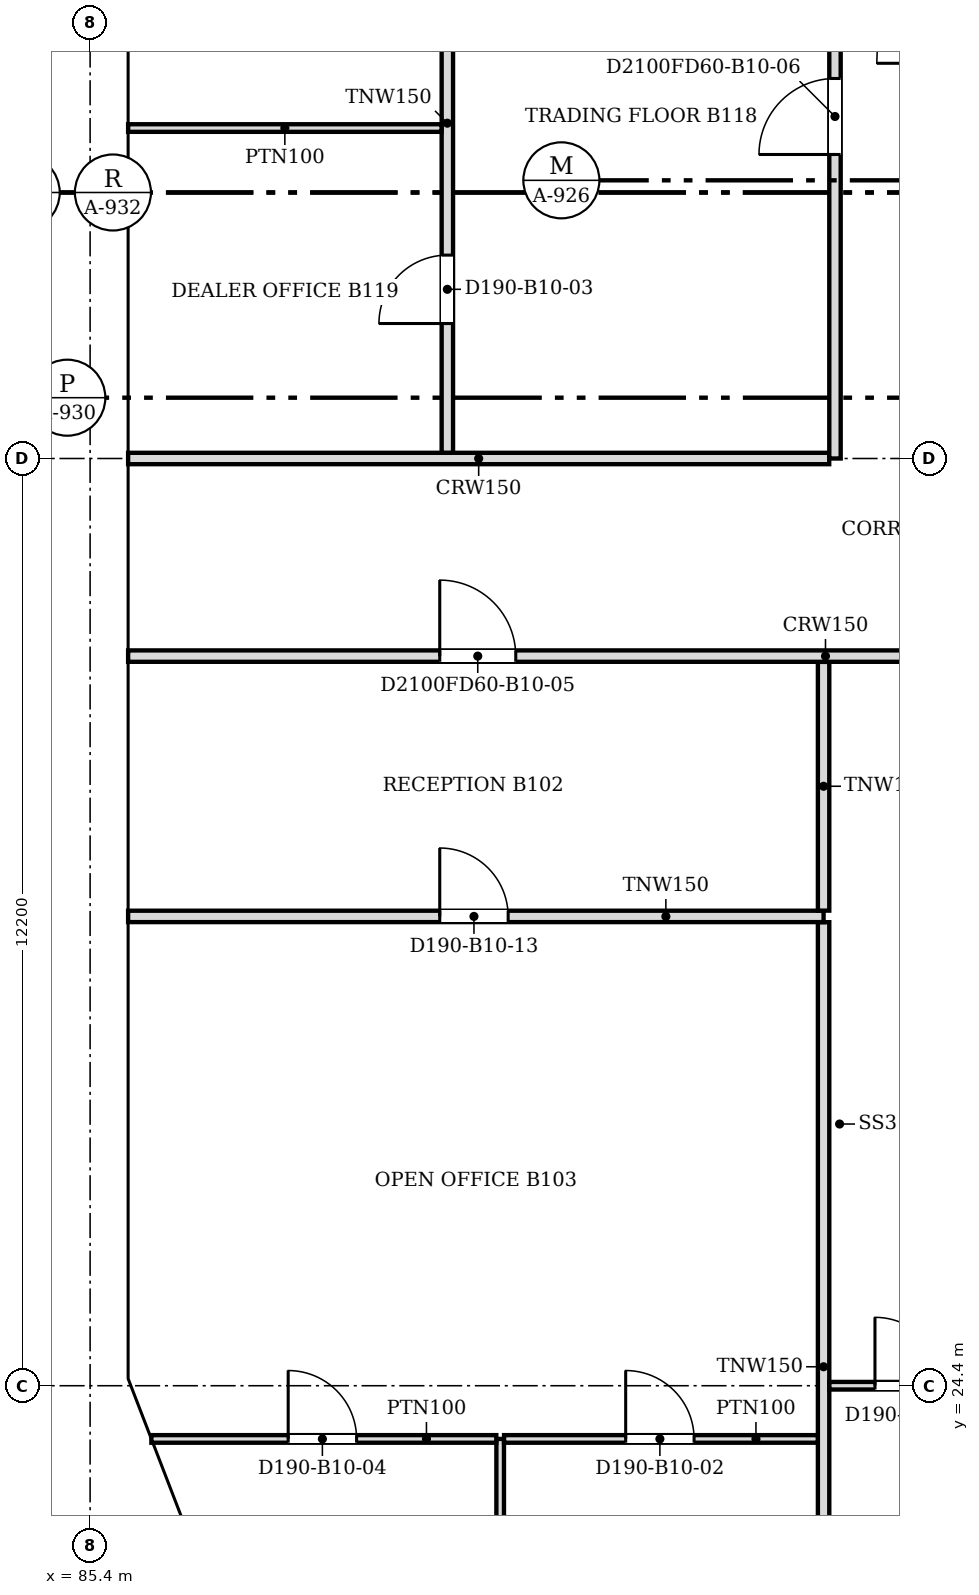
"""IFC4 building model, lengths in metres.
Left out: names, types, materials, properties, quantities, classifications, styles, units other than length and angle.
Written with IfcOpenShell. Run it as: python <this file> out.ifc"""

import sys

from ifc_helpers import new_model, si_unit, direction, frame, frame_2d, origin, place, context, subcontext, project, spatial, polyline, rectangle, outline, extrude, faceted_brep, source, transform, mapped, element, fill, save


model = new_model("IFC4")
c1 = context("Model", 3, precision=1e-05, world=origin(), true_north=direction((0.0, 1.0)))
c2 = subcontext(c1, "Body", "Model", "MODEL_VIEW")
j1 = project(units=[si_unit("LENGTHUNIT", "METRE"), si_unit("PLANEANGLEUNIT", "RADIAN")], contexts=[c1])
p1 = place(None, origin())
s1 = spatial("IfcSite", under=j1, at=p1, CompositionType="ELEMENT")
p2 = place(p1, origin())
s2 = spatial("IfcBuilding", under=s1, at=p2, CompositionType="ELEMENT")
p3 = place(p2, frame((0.0, 0.0, 102.8)))
s3 = spatial("IfcBuildingStorey", under=s2, at=p3, CompositionType="ELEMENT", Elevation=102.8)
m1 = source(origin(), c2, "Body", "Brep", [
    faceted_brep([(3.05, -0.25, 0.0), (6.1, -0.25, 3.8), (6.1, -0.25, 3.8), (3.05, -0.25, 7.6), (0.0, -0.25, 3.8), (0.0, 0.25, 3.8), (3.05, 0.25, 7.6), (6.1, 0.25, 3.8), (6.1, 0.25, 3.8), (3.05, 0.25, 0.0)], [[[0, 1, 2, 3, 4]], [[5, 6, 7, 8, 9]], [[9, 8, 1, 0]], [[7, 6, 3, 2]], [[6, 5, 4, 3]], [[5, 9, 0, 4]], [[1, 8, 7, 2]]]),
])
p4 = place(p3, frame((85.65, 42.7, -3.8), z_axis=(0.0, 0.0, 1.0), x_axis=(0.0, -1.0, 0.0)))
e1 = element("IfcWall", 1, at=p4, inside=s3, PredefinedType="SOLIDWALL", context=c2, shape_type="MappedRepresentation", body=[
    mapped(m1, transform((0.0, 0.0, 0.0), scale=1.0)),
])
m2 = source(origin(), c2, "Body", "SweptSolid", [
    extrude(outline(polyline([(3.05, 0.399), (5.78, 3.8), (3.05, 7.201), (0.321, 3.8), (3.05, 0.399)])), frame((0.0, 0.26, 0.0), z_axis=(0.0, -1.0, 0.0), x_axis=(1.0, 0.0, 0.0)), (0.0, 0.0, 1.0), 0.52),
])
p5 = place(p4, origin())
e2 = element("IfcOpeningElement", 2, at=p5, cuts=e1, PredefinedType="OPENING", context=c2, shape_type="MappedRepresentation", body=[
    mapped(m2, transform((0.0, 0.0, 0.0), scale=1.0)),
])
m3 = source(origin(), c2, "Body", "SweptSolid", [
    extrude(outline(polyline([(3.05, 0.0), (6.1, 3.8), (3.05, 7.6), (0.0, 3.8), (3.05, 0.0)])), frame((0.0, 0.25, 0.0), z_axis=(0.0, -1.0, 0.0), x_axis=(1.0, 0.0, 0.0)), (0.0, 0.0, 1.0), 0.5),
])
p6 = place(p3, frame((85.65, 36.6, -3.8), z_axis=(0.0, 0.0, 1.0), x_axis=(0.0, -1.0, 0.0)))
e3 = element("IfcWall", 3, at=p6, inside=s3, PredefinedType="SOLIDWALL", context=c2, shape_type="MappedRepresentation", body=[
    mapped(m3, transform((0.0, 0.0, 0.0), scale=1.0)),
])
p7 = place(p6, origin())
e4 = element("IfcOpeningElement", 4, at=p7, cuts=e3, PredefinedType="OPENING", context=c2, shape_type="MappedRepresentation", body=[
    mapped(m2, transform((0.0, 0.0, 0.0), scale=1.0)),
])
m4 = source(origin(), c2, "Body", "Brep", [
    faceted_brep([(3.05, -0.25, 0.0), (6.053, -0.25, 3.8), (3.05, -0.25, 7.6), (0.0, -0.25, 3.8), (0.0, 0.25, 3.8), (3.05, 0.25, 7.6), (6.007, 0.25, 3.859), (6.007, 0.25, 3.741), (3.05, 0.25, 0.0), (6.053, 0.0, 3.8)], [[[0, 1, 2, 3]], [[4, 5, 6, 7, 8]], [[8, 7, 9, 1, 0]], [[6, 5, 2, 1, 9]], [[5, 4, 3, 2]], [[4, 8, 0, 3]], [[9, 7, 6]]]),
])
p8 = place(p3, frame((85.65, 30.5, -3.8), z_axis=(0.0, 0.0, 1.0), x_axis=(0.0, -1.0, 0.0)))
e5 = element("IfcWall", 5, at=p8, inside=s3, PredefinedType="SOLIDWALL", context=c2, shape_type="MappedRepresentation", body=[
    mapped(m4, transform((0.0, 0.0, 0.0), scale=1.0)),
])
m5 = source(origin(), c2, "Body", "SweptSolid", [
    extrude(outline(polyline([(3.049, 0.401), (5.735, 3.8), (3.049, 7.199), (0.321, 3.8), (3.049, 0.401)])), frame((0.0, 0.26, 0.0), z_axis=(0.0, -1.0, 0.0), x_axis=(1.0, 0.0, 0.0)), (0.0, 0.0, 1.0), 0.52),
])
p9 = place(p8, origin())
e6 = element("IfcOpeningElement", 6, at=p9, cuts=e5, PredefinedType="OPENING", context=c2, shape_type="MappedRepresentation", body=[
    mapped(m5, transform((0.0, 0.0, 0.0), scale=1.0)),
])
m6 = source(origin(), c2, "Body", "Brep", [
    faceted_brep([(2.95, -0.25, 0.0), (3.003, -0.25, 0.068), (3.003, -0.25, 7.532), (2.95, -0.25, 7.6), (0.0, -0.25, 3.8), (0.047, 0.25, 3.86), (2.898, 0.25, 7.532), (2.898, 0.25, 0.068), (0.047, 0.25, 3.74), (2.95, 0.0, 0.0), (2.95, 0.0, 7.6), (0.0, 0.0, 3.8)], [[[0, 1, 2, 3, 4]], [[5, 6, 7, 8]], [[1, 0, 9]], [[10, 3, 2]], [[6, 5, 11, 4, 3, 10]], [[8, 7, 9, 0, 4, 11]], [[8, 11, 5]], [[1, 9, 7, 6, 10, 2]]]),
])
p10 = place(p3, frame((85.65, 24.447, -3.8), z_axis=(0.0, 0.0, 1.0), x_axis=(0.35992665181, -0.932980602862, 0.0)))
e7 = element("IfcWall", 7, at=p10, inside=s3, PredefinedType="SOLIDWALL", context=c2, shape_type="MappedRepresentation", body=[
    mapped(m6, transform((0.0, 0.0, 0.0), scale=1.0)),
])
m7 = source(origin(), c2, "Body", "SweptSolid", [
    extrude(outline(polyline([(2.75, 6.935), (0.316, 3.8), (2.75, 0.665), (2.75, 6.935)])), frame((0.0, 0.26, 0.0), z_axis=(0.0, -1.0, 0.0), x_axis=(1.0, 0.0, 0.0)), (0.0, 0.0, 1.0), 0.52),
])
p11 = place(p10, origin())
e8 = element("IfcOpeningElement", 8, at=p11, cuts=e7, PredefinedType="OPENING", context=c2, shape_type="MappedRepresentation", body=[
    mapped(m7, transform((0.0, 0.0, 0.0), scale=1.0)),
])
m8 = source(origin(), c2, "Body", "SweptSolid", [
    extrude(outline(polyline([(3.05, 0.0), (6.1, 3.8), (0.0, 3.8), (3.05, 0.0)])), frame((0.0, 0.25, 0.0), z_axis=(0.0, -1.0, 0.0), x_axis=(1.0, 0.0, 0.0)), (0.0, 0.0, 1.0), 0.5),
])
p12 = place(p3, frame((85.65, 45.75, 0.0), z_axis=(0.0, 0.0, 1.0), x_axis=(0.0, -1.0, 0.0)))
e9 = element("IfcWall", 9, at=p12, inside=s3, PredefinedType="SOLIDWALL", context=c2, shape_type="MappedRepresentation", body=[
    mapped(m8, transform((0.0, 0.0, 0.0), scale=1.0)),
])
m9 = source(origin(), c2, "Body", "SweptSolid", [
    extrude(outline(polyline([(3.05, 0.399), (5.579, 3.55), (0.521, 3.55), (3.05, 0.399)])), frame((0.0, 0.26, 0.0), z_axis=(0.0, -1.0, 0.0), x_axis=(1.0, 0.0, 0.0)), (0.0, 0.0, 1.0), 0.52),
])
p13 = place(p12, origin())
e10 = element("IfcOpeningElement", 10, at=p13, cuts=e9, PredefinedType="OPENING", context=c2, shape_type="MappedRepresentation", body=[
    mapped(m9, transform((0.0, 0.0, 0.0), scale=1.0)),
])
m10 = source(origin(), c2, "Body", "Brep", [
    faceted_brep([(3.05, -0.25, 0.0), (6.1, -0.25, 3.8), (6.1, -0.25, 3.8), (0.0, -0.25, 3.8), (0.0, 0.25, 3.8), (6.1, 0.25, 3.8), (6.1, 0.25, 3.8), (3.05, 0.25, 0.0)], [[[0, 1, 2, 3]], [[4, 5, 6, 7]], [[7, 6, 1, 0]], [[5, 4, 3, 2]], [[4, 7, 0, 3]], [[1, 6, 5, 2]]]),
])
p14 = place(p3, frame((85.65, 39.65, 0.0), z_axis=(0.0, 0.0, 1.0), x_axis=(0.0, -1.0, 0.0)))
e11 = element("IfcWall", 11, at=p14, inside=s3, PredefinedType="SOLIDWALL", context=c2, shape_type="MappedRepresentation", body=[
    mapped(m10, transform((0.0, 0.0, 0.0), scale=1.0)),
])
p15 = place(p14, origin())
e12 = element("IfcOpeningElement", 12, at=p15, cuts=e11, PredefinedType="OPENING", context=c2, shape_type="MappedRepresentation", body=[
    mapped(m9, transform((0.0, 0.0, 0.0), scale=1.0)),
])
p16 = place(p3, frame((85.65, 33.55, 0.0), z_axis=(0.0, 0.0, 1.0), x_axis=(0.0, -1.0, 0.0)))
e13 = element("IfcWall", 13, at=p16, inside=s3, PredefinedType="SOLIDWALL", context=c2, shape_type="MappedRepresentation", body=[
    mapped(m8, transform((0.0, 0.0, 0.0), scale=1.0)),
])
p17 = place(p16, origin())
e14 = element("IfcOpeningElement", 14, at=p17, cuts=e13, PredefinedType="OPENING", context=c2, shape_type="MappedRepresentation", body=[
    mapped(m9, transform((0.0, 0.0, 0.0), scale=1.0)),
])
m11 = source(origin(), c2, "Body", "Brep", [
    faceted_brep([(3.003, -0.25, 0.0), (3.05, -0.25, 0.06), (3.05, -0.25, 3.8), (0.0, -0.25, 3.8), (0.0, 0.25, 3.8), (2.957, 0.25, 3.8), (2.957, 0.25, 0.059), (3.003, 0.0, 0.0)], [[[0, 1, 2, 3]], [[4, 5, 6]], [[1, 0, 7]], [[5, 4, 3, 2]], [[4, 6, 7, 0, 3]], [[1, 7, 6, 5, 2]]]),
])
p18 = place(p3, frame((85.65, 27.45, 0.0), z_axis=(0.0, 0.0, 1.0), x_axis=(0.0, -1.0, 0.0)))
e15 = element("IfcWall", 15, at=p18, inside=s3, PredefinedType="SOLIDWALL", context=c2, shape_type="MappedRepresentation", body=[
    mapped(m11, transform((0.0, 0.0, 0.0), scale=1.0)),
])
m12 = source(origin(), c2, "Body", "SweptSolid", [
    extrude(outline(polyline([(2.803, 3.55), (0.516, 3.55), (2.803, 0.656), (2.803, 3.55)])), frame((0.0, 0.26, 0.0), z_axis=(0.0, -1.0, 0.0), x_axis=(1.0, 0.0, 0.0)), (0.0, 0.0, 1.0), 0.52),
])
p19 = place(p18, origin())
e16 = element("IfcOpeningElement", 16, at=p19, cuts=e15, PredefinedType="OPENING", context=c2, shape_type="MappedRepresentation", body=[
    mapped(m12, transform((0.0, 0.0, 0.0), scale=1.0)),
])
m13 = source(origin(), c2, "Body", "Brep", [
    faceted_brep([(0.047, -0.25, 0.0), (2.997, -0.25, 3.8), (0.0, -0.25, 3.8), (0.0, -0.25, 0.059), (0.093, 0.25, 3.8), (2.944, 0.25, 3.8), (2.944, 0.25, 3.732), (0.093, 0.25, 0.06), (2.997, 0.0, 3.8), (0.047, 0.0, 0.0)], [[[0, 1, 2, 3]], [[4, 5, 6, 7]], [[7, 6, 8, 1, 0, 9]], [[5, 4, 2, 1, 8]], [[9, 0, 3]], [[7, 9, 3, 2, 4]], [[6, 5, 8]]]),
])
p20 = place(p3, frame((85.633, 24.49, 0.0), z_axis=(0.0, 0.0, 1.0), x_axis=(0.359901446078, -0.932990326376, 0.0)))
e17 = element("IfcWall", 17, at=p20, inside=s3, PredefinedType="SOLIDWALL", context=c2, shape_type="MappedRepresentation", body=[
    mapped(m13, transform((0.0, 0.0, 0.0), scale=1.0)),
])
m14 = source(origin(), c2, "Body", "SweptSolid", [
    extrude(outline(polyline([(0.247, 0.665), (2.487, 3.55), (0.247, 3.55), (0.247, 0.665)])), frame((0.0, 0.26, 0.0), z_axis=(0.0, -1.0, 0.0), x_axis=(1.0, 0.0, 0.0)), (0.0, 0.0, 1.0), 0.52),
])
p21 = place(p20, origin())
e18 = element("IfcOpeningElement", 18, at=p21, cuts=e17, PredefinedType="OPENING", context=c2, shape_type="MappedRepresentation", body=[
    mapped(m14, transform((0.0, 0.0, 0.0), scale=1.0)),
])
p22 = place(p3, frame((95.05, 18.8, 0.0), z_axis=(0.0, 0.0, 1.0), x_axis=(0.0, 1.0, 0.0)))
e19 = element("IfcWall", 19, at=p22, inside=s3, PredefinedType="PARTITIONING", context=c2, shape_type="SweptSolid", body=[
    extrude(rectangle(XDim=11.699, YDim=0.15, at=frame_2d((5.85, 0.0))), origin(), (0.0, 0.0, 1.0), 2.715),
])
p23 = place(p3, frame((90.795, 19.108, 0.0), z_axis=(0.0, 0.0, 1.0), x_axis=(0.0, 1.0, 0.0)))
e20 = element("IfcWall", 20, at=p23, inside=s3, PredefinedType="PARTITIONING", context=c2, shape_type="SweptSolid", body=[
    extrude(rectangle(XDim=4.592, YDim=0.1, at=frame_2d((2.296, 0.0))), origin(), (0.0, 0.0, 1.0), 2.715),
])
p24 = place(p3, frame((90.744, 23.7, 0.0), z_axis=(0.0, 0.0, 1.0), x_axis=(-1.0, 0.0, 0.0)))
e21 = element("IfcWall", 21, at=p24, inside=s3, PredefinedType="PARTITIONING", context=c2, shape_type="SweptSolid", body=[
    extrude(rectangle(XDim=4.538, YDim=0.1, at=frame_2d((2.269, 0.0))), origin(), (0.0, 0.0, 1.0), 2.715),
])
m15 = source(origin(), c2, "Body", "SweptSolid", [
    extrude(rectangle(XDim=0.9, YDim=2.1, at=frame_2d((0.45, 1.05))), frame((0.0, 0.06, 0.0), z_axis=(0.0, -1.0, 0.0), x_axis=(1.0, 0.0, 0.0)), (0.0, 0.0, 1.0), 0.12),
])
p25 = place(p24, frame((1.838, 0.0, 0.0)))
e22 = element("IfcOpeningElement", 22, at=p25, cuts=e21, PredefinedType="OPENING", context=c2, shape_type="MappedRepresentation", body=[
    mapped(m15, transform((0.0, 0.0, 0.0), scale=1.0)),
])
p26 = place(p3, frame((94.974, 23.7, 0.0), z_axis=(0.0, 0.0, 1.0), x_axis=(-1.0, 0.0, 0.0)))
e23 = element("IfcWall", 23, at=p26, inside=s3, PredefinedType="PARTITIONING", context=c2, shape_type="SweptSolid", body=[
    extrude(rectangle(XDim=4.128, YDim=0.1, at=frame_2d((2.064, 0.0))), origin(), (0.0, 0.0, 1.0), 2.715),
])
p27 = place(p26, frame((1.628, 0.0, 0.0)))
e24 = element("IfcOpeningElement", 24, at=p27, cuts=e23, PredefinedType="OPENING", context=c2, shape_type="MappedRepresentation", body=[
    mapped(m15, transform((0.0, 0.0, 0.0), scale=1.0)),
])
p28 = place(p3, frame((97.249, 24.4, 0.0), z_axis=(0.0, 0.0, 1.0), x_axis=(-1.0, 0.0, 0.0)))
e25 = element("IfcWall", 25, at=p28, inside=s3, PredefinedType="PARTITIONING", context=c2, shape_type="SweptSolid", body=[
    extrude(rectangle(XDim=2.123, YDim=0.1, at=frame_2d((1.062, 0.0))), origin(), (0.0, 0.0, 1.0), 2.715),
])
p29 = place(p28, frame((0.623, 0.0, 0.0)))
e26 = element("IfcOpeningElement", 26, at=p29, cuts=e25, PredefinedType="OPENING", context=c2, shape_type="MappedRepresentation", body=[
    mapped(m15, transform((0.0, 0.0, 0.0), scale=1.0)),
])
p30 = place(p3, frame((95.05, 30.575, 0.0), z_axis=(0.0, 0.0, 1.0), x_axis=(-1.0, 0.0, 0.0)))
e27 = element("IfcWall", 27, at=p30, inside=s3, PredefinedType="PARTITIONING", context=c2, shape_type="SweptSolid", body=[
    extrude(rectangle(XDim=9.15, YDim=0.15, at=frame_2d((4.575, 0.0))), origin(), (0.0, 0.0, 1.0), 2.715),
])
m16 = source(origin(), c2, "Body", "SweptSolid", [
    extrude(rectangle(XDim=0.9, YDim=2.1, at=frame_2d((0.45, 1.05))), frame((0.0, 0.085, 0.0), z_axis=(0.0, -1.0, 0.0), x_axis=(1.0, 0.0, 0.0)), (0.0, 0.0, 1.0), 0.17),
])
p31 = place(p30, frame((4.15, 0.0, 0.0)))
e28 = element("IfcOpeningElement", 28, at=p31, cuts=e27, PredefinedType="OPENING", context=c2, shape_type="MappedRepresentation", body=[
    mapped(m16, transform((0.0, 0.0, 0.0), scale=1.0)),
])
p32 = place(p3, frame((95.05, 30.651, 0.0), z_axis=(0.0, 0.0, 1.0), x_axis=(0.0, 1.0, 0.0)))
e29 = element("IfcWall", 29, at=p32, inside=s3, PredefinedType="PARTITIONING", context=c2, shape_type="SweptSolid", body=[
    extrude(rectangle(XDim=3.273, YDim=0.15, at=frame_2d((1.637, 0.0))), origin(), (0.0, 0.0, 1.0), 2.715),
])
p33 = place(p3, frame((121.5, 34.0, 0.0), z_axis=(0.0, 0.0, 1.0), x_axis=(-1.0, 0.0, 0.0)))
e30 = element("IfcWall", 30, at=p33, inside=s3, PredefinedType="PARTITIONING", context=c2, shape_type="SweptSolid", body=[
    extrude(rectangle(XDim=35.6, YDim=0.15, at=frame_2d((17.8, 0.0))), origin(), (0.0, 0.0, 1.0), 2.715),
])
m17 = source(origin(), c2, "Body", "SweptSolid", [
    extrude(rectangle(XDim=1.0, YDim=2.1, at=frame_2d((0.5, 1.05))), frame((0.0, 0.085, 0.0), z_axis=(0.0, -1.0, 0.0), x_axis=(1.0, 0.0, 0.0)), (0.0, 0.0, 1.0), 0.17),
])
p34 = place(p33, frame((2.099, 0.0, 0.0)))
e31 = element("IfcOpeningElement", 31, at=p34, cuts=e30, PredefinedType="OPENING", context=c2, shape_type="MappedRepresentation", body=[
    mapped(m17, transform((0.0, 0.0, 0.0), scale=1.0)),
])
p35 = place(p33, frame((13.999, 0.0, 0.0)))
e32 = element("IfcOpeningElement", 32, at=p35, cuts=e30, PredefinedType="OPENING", context=c2, shape_type="MappedRepresentation", body=[
    mapped(m17, transform((0.0, 0.0, 0.0), scale=1.0)),
])
p36 = place(p33, frame((7.9, 0.0, 0.0)))
e33 = element("IfcOpeningElement", 33, at=p36, cuts=e30, PredefinedType="OPENING", context=c2, shape_type="MappedRepresentation", body=[
    mapped(m17, transform((0.0, 0.0, 0.0), scale=1.0)),
])
p37 = place(p33, frame((30.5, 0.0, 0.0)))
e34 = element("IfcOpeningElement", 34, at=p37, cuts=e30, PredefinedType="OPENING", context=c2, shape_type="MappedRepresentation", body=[
    mapped(m17, transform((0.0, 0.0, 0.0), scale=1.0)),
])
p38 = place(p33, frame((21.45, 0.0, 0.0)))
e35 = element("IfcOpeningElement", 35, at=p38, cuts=e30, PredefinedType="OPENING", context=c2, shape_type="MappedRepresentation", body=[
    mapped(m16, transform((0.0, 0.0, 0.0), scale=1.0)),
])
p39 = place(p3, frame((85.9, 36.6, 0.0), z_axis=(0.0, 0.0, 1.0), x_axis=(1.0, 0.0, 0.0)))
e36 = element("IfcWall", 36, at=p39, inside=s3, PredefinedType="PARTITIONING", context=c2, shape_type="SweptSolid", body=[
    extrude(rectangle(XDim=9.224, YDim=0.15, at=frame_2d((4.612, 0.0))), origin(), (0.0, 0.0, 1.0), 2.715),
])
p40 = place(p3, frame((95.2, 36.6, 0.0), z_axis=(0.0, 0.0, 1.0), x_axis=(0.0, 1.0, 0.0)))
e37 = element("IfcWall", 37, at=p40, inside=s3, PredefinedType="PARTITIONING", context=c2, shape_type="SweptSolid", body=[
    extrude(rectangle(XDim=14.6, YDim=0.15, at=frame_2d((7.3, 0.0))), origin(), (0.0, 0.0, 1.0), 2.715),
])
p41 = place(p40, frame((11.301, 0.0, 0.0)))
e38 = element("IfcOpeningElement", 38, at=p41, cuts=e37, PredefinedType="OPENING", context=c2, shape_type="MappedRepresentation", body=[
    mapped(m17, transform((0.0, 0.0, 0.0), scale=1.0)),
])
p42 = place(p40, frame((4.0, 0.0, 0.0)))
e39 = element("IfcOpeningElement", 39, at=p42, cuts=e37, PredefinedType="OPENING", context=c2, shape_type="MappedRepresentation", body=[
    mapped(m17, transform((0.0, 0.0, 0.0), scale=1.0)),
])
p43 = place(p3, frame((90.1, 36.676, 0.0), z_axis=(0.0, 0.0, 1.0), x_axis=(0.0, 1.0, 0.0)))
e40 = element("IfcWall", 40, at=p43, inside=s3, PredefinedType="PARTITIONING", context=c2, shape_type="SweptSolid", body=[
    extrude(rectangle(XDim=8.848, YDim=0.15, at=frame_2d((4.424, 0.0))), origin(), (0.0, 0.0, 1.0), 2.715),
])
p44 = place(p43, frame((1.7, 0.0, 0.0)))
e41 = element("IfcOpeningElement", 41, at=p44, cuts=e40, PredefinedType="OPENING", context=c2, shape_type="MappedRepresentation", body=[
    mapped(m16, transform((0.0, 0.0, 0.0), scale=1.0)),
])
p45 = place(p43, frame((6.072, 0.0, 0.0)))
e42 = element("IfcOpeningElement", 42, at=p45, cuts=e40, PredefinedType="OPENING", context=c2, shape_type="MappedRepresentation", body=[
    mapped(m16, transform((0.0, 0.0, 0.0), scale=1.0)),
])
p46 = place(p3, frame((85.9, 40.948, 0.0), z_axis=(0.0, 0.0, 1.0), x_axis=(1.0, 0.0, 0.0)))
e43 = element("IfcWall", 43, at=p46, inside=s3, PredefinedType="PARTITIONING", context=c2, shape_type="SweptSolid", body=[
    extrude(rectangle(XDim=4.124, YDim=0.1, at=frame_2d((2.062, 0.0))), origin(), (0.0, 0.0, 1.0), 2.715),
])
m18 = source(origin(), c2, "Body", "SweptSolid", [
    extrude(rectangle(XDim=0.9, YDim=2.1, at=frame_2d((0.45, 1.05))), frame((0.0, 0.025, 0.0), z_axis=(0.0, -1.0, 0.0), x_axis=(1.0, 0.0, 0.0)), (0.0, 0.0, 1.0), 0.05),
])
p47 = place(p29, origin())
e44 = element("IfcDoor", 44, at=p47, inside=s3, OperationType="SINGLE_SWING_RIGHT", PredefinedType="DOOR", context=c2, shape_type="MappedRepresentation", body=[
    mapped(m18, transform((0.0, 0.0, 0.0), scale=1.0)),
])
fill(e26, e44)
p48 = place(p27, origin())
e45 = element("IfcDoor", 45, at=p48, inside=s3, OperationType="SINGLE_SWING_RIGHT", PredefinedType="DOOR", context=c2, shape_type="MappedRepresentation", body=[
    mapped(m18, transform((0.0, 0.0, 0.0), scale=1.0)),
])
fill(e24, e45)
p49 = place(p44, origin())
e46 = element("IfcDoor", 46, at=p49, inside=s3, OperationType="SINGLE_SWING_LEFT", PredefinedType="DOOR", context=c2, shape_type="MappedRepresentation", body=[
    mapped(m18, transform((0.0, 0.0, 0.0), scale=1.0)),
])
fill(e41, e46)
p50 = place(p25, origin())
e47 = element("IfcDoor", 47, at=p50, inside=s3, OperationType="SINGLE_SWING_RIGHT", PredefinedType="DOOR", context=c2, shape_type="MappedRepresentation", body=[
    mapped(m18, transform((0.0, 0.0, 0.0), scale=1.0)),
])
fill(e22, e47)
m19 = source(origin(), c2, "Body", "SweptSolid", [
    extrude(rectangle(XDim=1.0, YDim=2.1, at=frame_2d((0.5, 1.05))), frame((0.0, 0.025, 0.0), z_axis=(0.0, -1.0, 0.0), x_axis=(1.0, 0.0, 0.0)), (0.0, 0.0, 1.0), 0.05),
])
p51 = place(p37, origin())
e48 = element("IfcDoor", 48, at=p51, inside=s3, OperationType="SINGLE_SWING_RIGHT", PredefinedType="DOOR", context=c2, shape_type="MappedRepresentation", body=[
    mapped(m19, transform((0.0, 0.0, 0.0), scale=1.0)),
])
fill(e34, e48)
p52 = place(p31, origin())
e49 = element("IfcDoor", 49, at=p52, inside=s3, OperationType="SINGLE_SWING_RIGHT", PredefinedType="DOOR", context=c2, shape_type="MappedRepresentation", body=[
    mapped(m18, transform((0.0, 0.0, 0.0), scale=1.0)),
])
fill(e28, e49)
p53 = place(p42, origin())
e50 = element("IfcDoor", 50, at=p53, inside=s3, OperationType="SINGLE_SWING_LEFT", PredefinedType="DOOR", context=c2, shape_type="MappedRepresentation", body=[
    mapped(m19, transform((0.0, 0.0, 0.0), scale=1.0)),
])
fill(e39, e50)
save(model, sys.argv[1])
